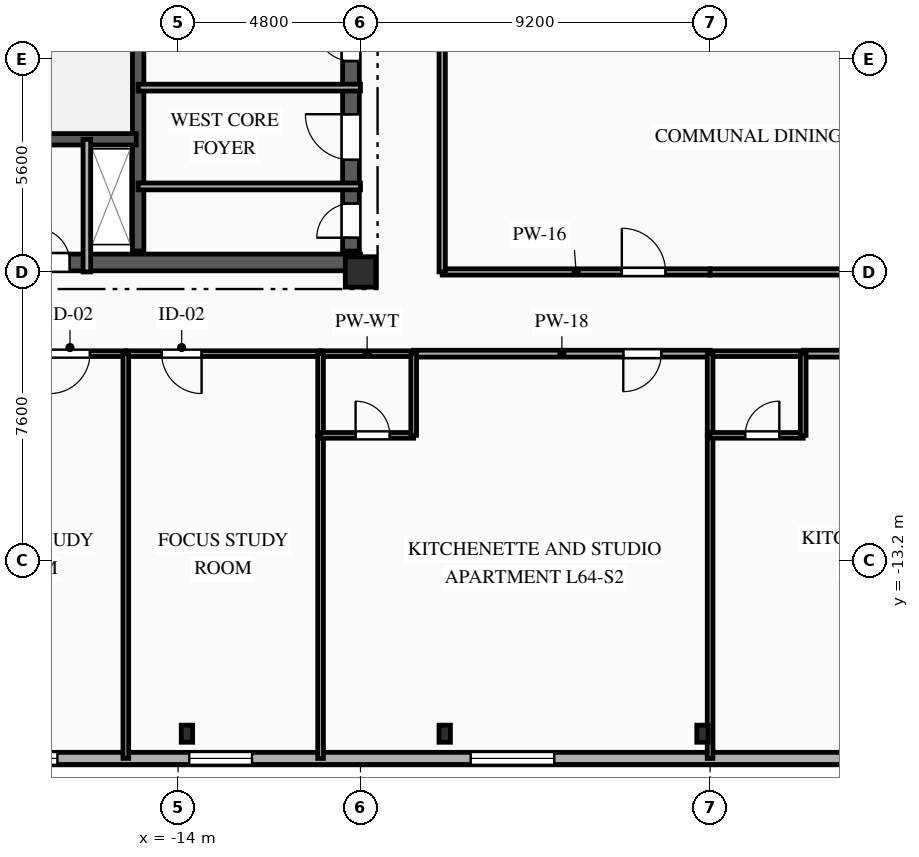
"""IFC4 building model, lengths in metres.
Left out: names, types, materials, properties, quantities, classifications, styles, units other than length and angle.
Written with IfcOpenShell. Run it as: python <this file> out.ifc"""

import sys

from ifc_helpers import new_model, si_unit, direction, frame, frame_2d, origin, origin_2d, place, context, subcontext, project, spatial, rectangle, i_section, extrude, element, fill, save


model = new_model("IFC4")
c1 = context("Model", 3, precision=1e-05, world=origin(), true_north=direction((0.0, 1.0)))
c2 = subcontext(c1, "Body", "Model", "MODEL_VIEW")
j1 = project(units=[si_unit("LENGTHUNIT", "METRE"), si_unit("PLANEANGLEUNIT", "RADIAN")], contexts=[c1])
p1 = place(None, origin())
s1 = spatial("IfcSite", under=j1, at=p1, CompositionType="ELEMENT")
p2 = place(p1, origin())
s2 = spatial("IfcBuilding", under=s1, at=p2, CompositionType="ELEMENT")
p3 = place(p2, frame((0.0, 0.0, 228.3)))
s3 = spatial("IfcBuildingStorey", under=s2, at=p3, CompositionType="ELEMENT", Elevation=228.3)
p4 = place(p3, frame((-9.2, -5.6, 0.0), z_axis=(0.0, 0.0, 1.0), x_axis=(1.0, 0.0, 0.0)))
e1 = element("IfcColumn", 1, at=p4, inside=s3, PredefinedType="COLUMN", context=c2, shape_type="SweptSolid", body=[
    extrude(rectangle(XDim=0.8, YDim=0.8, at=origin_2d()), origin(), (0.0, 0.0, 1.0), 3.35),
])
for number, where, z_axis, x_axis in (
    (2, (-13.767, -17.75, 0.0), (0.0, 0.0, 1.0), (1.0, 0.0, 0.0)),
    (3, (-6.983, -17.75, 0.0), (0.0, 0.0, 1.0), (1.0, 0.0, 0.0)),
    (4, (-0.2, -17.75, 0.0), (0.0, 0.0, 1.0), (1.0, 0.0, 0.0)),
):
    element("IfcColumn", number, at=place(p3, frame(where, z_axis=z_axis, x_axis=x_axis)), inside=s3, PredefinedType="COLUMN", context=c2, shape_type="SweptSolid", body=[
        extrude(i_section(OverallWidth=0.3, OverallDepth=0.45, WebThickness=0.014, FlangeThickness=0.026, FilletRadius=0.027, at=origin_2d()), origin(), (0.0, 0.0, 1.0), 3.35),
    ])
p5 = place(p3, frame((20.8, -18.4, 0.0), z_axis=(0.0, 0.0, 1.0), x_axis=(-1.0, 0.0, 0.0)))
e5 = element("IfcWall", 5, at=p5, inside=s3, PredefinedType="SOLIDWALL", context=c2, shape_type="SweptSolid", body=[
    extrude(rectangle(XDim=42.0, YDim=0.32, at=frame_2d((21.0, 0.0))), origin(), (0.0, 0.0, 1.0), 3.04),
])
p6 = place(p5, frame((2.135, 0.0, 0.85)))
e6 = element("IfcOpeningElement", 6, at=p6, cuts=e5, PredefinedType="OPENING", context=c2, shape_type="SweptSolid", body=[
    extrude(rectangle(XDim=1.65, YDim=1.85, at=frame_2d((0.825, 0.925))), frame((0.0, 0.17, 0.0), z_axis=(0.0, -1.0, 0.0), x_axis=(1.0, 0.0, 0.0)), (0.0, 0.0, 1.0), 0.34),
])
p7 = place(p5, frame((7.175, 0.0, 0.85)))
e7 = element("IfcOpeningElement", 7, at=p7, cuts=e5, PredefinedType="OPENING", context=c2, shape_type="SweptSolid", body=[
    extrude(rectangle(XDim=1.65, YDim=1.85, at=frame_2d((0.825, 0.925))), frame((0.0, 0.17, 0.0), z_axis=(0.0, -1.0, 0.0), x_axis=(1.0, 0.0, 0.0)), (0.0, 0.0, 1.0), 0.34),
])
p8 = place(p5, frame((14.58, 0.0, 0.85)))
e8 = element("IfcOpeningElement", 8, at=p8, cuts=e5, PredefinedType="OPENING", context=c2, shape_type="SweptSolid", body=[
    extrude(rectangle(XDim=2.2, YDim=1.85, at=frame_2d((1.1, 0.925))), frame((0.0, 0.17, 0.0), z_axis=(0.0, -1.0, 0.0), x_axis=(1.0, 0.0, 0.0)), (0.0, 0.0, 1.0), 0.34),
])
p9 = place(p5, frame((24.9, 0.0, 0.85)))
e9 = element("IfcOpeningElement", 9, at=p9, cuts=e5, PredefinedType="OPENING", context=c2, shape_type="SweptSolid", body=[
    extrude(rectangle(XDim=2.2, YDim=1.85, at=frame_2d((1.1, 0.925))), frame((0.0, 0.17, 0.0), z_axis=(0.0, -1.0, 0.0), x_axis=(1.0, 0.0, 0.0)), (0.0, 0.0, 1.0), 0.34),
])
p10 = place(p5, frame((32.855, 0.0, 0.85)))
e10 = element("IfcOpeningElement", 10, at=p10, cuts=e5, PredefinedType="OPENING", context=c2, shape_type="SweptSolid", body=[
    extrude(rectangle(XDim=1.65, YDim=1.85, at=frame_2d((0.825, 0.925))), frame((0.0, 0.17, 0.0), z_axis=(0.0, -1.0, 0.0), x_axis=(1.0, 0.0, 0.0)), (0.0, 0.0, 1.0), 0.34),
])
p11 = place(p5, frame((37.975, 0.0, 0.85)))
e11 = element("IfcOpeningElement", 11, at=p11, cuts=e5, PredefinedType="OPENING", context=c2, shape_type="SweptSolid", body=[
    extrude(rectangle(XDim=1.65, YDim=1.85, at=frame_2d((0.825, 0.925))), frame((0.0, 0.17, 0.0), z_axis=(0.0, -1.0, 0.0), x_axis=(1.0, 0.0, 0.0)), (0.0, 0.0, 1.0), 0.34),
])
p12 = place(p3, frame((-18.8, -5.35, 0.0), z_axis=(0.0, 0.0, 1.0), x_axis=(1.0, 0.0, 0.0)))
e12 = element("IfcWall", 12, at=p12, inside=s3, PredefinedType="SHEAR", context=c2, shape_type="SweptSolid", body=[
    extrude(rectangle(XDim=9.6, YDim=0.44, at=frame_2d((4.8, 0.0))), origin(), (0.0, 0.0, 1.0), 3.04),
])
p13 = place(p12, frame((1.05, 0.0, 0.0)))
e13 = element("IfcOpeningElement", 13, at=p13, cuts=e12, PredefinedType="OPENING", context=c2, shape_type="SweptSolid", body=[
    extrude(rectangle(XDim=0.9, YDim=2.1, at=frame_2d((0.45, 1.05))), frame((0.0, 0.23, 0.0), z_axis=(0.0, -1.0, 0.0), x_axis=(1.0, 0.0, 0.0)), (0.0, 0.0, 1.0), 0.46),
])
p14 = place(p3, frame((-9.45, -5.05, 0.0), z_axis=(0.0, 0.0, 1.0), x_axis=(0.0, 1.0, 0.0)))
e14 = element("IfcWall", 14, at=p14, inside=s3, PredefinedType="SHEAR", context=c2, shape_type="SweptSolid", body=[
    extrude(rectangle(XDim=10.1, YDim=0.44, at=frame_2d((5.05, 0.0))), origin(), (0.0, 0.0, 1.0), 3.04),
])
p15 = place(p14, frame((7.175, 0.0, 0.0)))
e15 = element("IfcOpeningElement", 15, at=p15, cuts=e14, PredefinedType="OPENING", context=c2, shape_type="SweptSolid", body=[
    extrude(rectangle(XDim=0.9, YDim=2.1, at=frame_2d((0.45, 1.05))), frame((0.0, 0.23, 0.0), z_axis=(0.0, -1.0, 0.0), x_axis=(1.0, 0.0, 0.0)), (0.0, 0.0, 1.0), 0.46),
])
p16 = place(p14, frame((2.4, 0.0, 0.0)))
e16 = element("IfcOpeningElement", 16, at=p16, cuts=e14, PredefinedType="OPENING", context=c2, shape_type="SweptSolid", body=[
    extrude(rectangle(XDim=1.2, YDim=2.15, at=frame_2d((0.6, 1.075))), frame((0.0, 0.23, 0.0), z_axis=(0.0, -1.0, 0.0), x_axis=(1.0, 0.0, 0.0)), (0.0, 0.0, 1.0), 0.46),
])
p17 = place(p14, frame((0.35, 0.0, 0.0)))
e17 = element("IfcOpeningElement", 17, at=p17, cuts=e14, PredefinedType="OPENING", context=c2, shape_type="SweptSolid", body=[
    extrude(rectangle(XDim=0.9, YDim=2.1, at=frame_2d((0.45, 1.05))), frame((0.0, 0.23, 0.0), z_axis=(0.0, -1.0, 0.0), x_axis=(1.0, 0.0, 0.0)), (0.0, 0.0, 1.0), 0.46),
])
p18 = place(p14, frame((5.0, 0.0, 0.0)))
e18 = element("IfcOpeningElement", 18, at=p18, cuts=e14, PredefinedType="OPENING", context=c2, shape_type="SweptSolid", body=[
    extrude(rectangle(XDim=0.9, YDim=2.1, at=frame_2d((0.45, 1.05))), frame((0.0, 0.23, 0.0), z_axis=(0.0, -1.0, 0.0), x_axis=(1.0, 0.0, 0.0)), (0.0, 0.0, 1.0), 0.46),
])
p19 = place(p3, frame((-15.05, -5.05, 0.0), z_axis=(0.0, 0.0, 1.0), x_axis=(0.0, 1.0, 0.0)))
e19 = element("IfcWall", 19, at=p19, inside=s3, PredefinedType="SHEAR", context=c2, shape_type="SweptSolid", body=[
    extrude(rectangle(XDim=10.1, YDim=0.3, at=frame_2d((5.05, 0.0))), origin(), (0.0, 0.0, 1.0), 3.04),
])
p20 = place(p3, frame((-18.28, -2.11, 0.0), z_axis=(0.0, 0.0, 1.0), x_axis=(1.0, 0.0, 0.0)))
e20 = element("IfcWall", 20, at=p20, inside=s3, PredefinedType="SHEAR", context=c2, shape_type="SweptSolid", body=[
    extrude(rectangle(XDim=3.18, YDim=0.3, at=frame_2d((1.59, 0.0))), origin(), (0.0, 0.0, 1.0), 3.04),
])
p21 = place(p3, frame((-16.4, -5.6, 0.0), z_axis=(0.0, 0.0, 1.0), x_axis=(0.0, 1.0, 0.0)))
e21 = element("IfcWall", 21, at=p21, inside=s3, PredefinedType="PARTITIONING", context=c2, shape_type="SweptSolid", body=[
    extrude(rectangle(XDim=3.49, YDim=0.2, at=frame_2d((1.745, 0.0))), origin(), (0.0, 0.0, 1.0), 3.04),
])
p22 = place(p3, frame((-15.05, -3.35, 0.0), z_axis=(0.0, 0.0, 1.0), x_axis=(1.0, 0.0, 0.0)))
e22 = element("IfcWall", 22, at=p22, inside=s3, PredefinedType="PARTITIONING", context=c2, shape_type="SweptSolid", body=[
    extrude(rectangle(XDim=5.85, YDim=0.18, at=frame_2d((2.925, 0.0))), origin(), (0.0, 0.0, 1.0), 2.755),
])
p23 = place(p3, frame((-9.2, -0.75, 0.0), z_axis=(0.0, 0.0, 1.0), x_axis=(-1.0, 0.0, 0.0)))
e23 = element("IfcWall", 23, at=p23, inside=s3, PredefinedType="PARTITIONING", context=c2, shape_type="SweptSolid", body=[
    extrude(rectangle(XDim=5.85, YDim=0.18, at=frame_2d((2.925, 0.0))), origin(), (0.0, 0.0, 1.0), 3.04),
])
p24 = place(p3, frame((-15.375, -7.75, 0.0), z_axis=(0.0, 0.0, 1.0), x_axis=(-1.0, 0.0, 0.0)))
e24 = element("IfcWall", 24, at=p24, inside=s3, PredefinedType="PARTITIONING", context=c2, shape_type="SweptSolid", body=[
    extrude(rectangle(XDim=5.125, YDim=0.15, at=frame_2d((2.562, 0.0))), origin(), (0.0, 0.0, 1.0), 3.04),
])
p25 = place(p24, frame((0.944, 0.0, 0.0)))
e25 = element("IfcOpeningElement", 25, at=p25, cuts=e24, PredefinedType="OPENING", context=c2, shape_type="SweptSolid", body=[
    extrude(rectangle(XDim=1.05, YDim=2.15, at=frame_2d((0.525, 1.075))), frame((0.0, 0.085, 0.0), z_axis=(0.0, -1.0, 0.0), x_axis=(1.0, 0.0, 0.0)), (0.0, 0.0, 1.0), 0.17),
])
p26 = place(p3, frame((-10.25, -7.75, 0.0), z_axis=(0.0, 0.0, 1.0), x_axis=(-1.0, 0.0, 0.0)))
e26 = element("IfcWall", 26, at=p26, inside=s3, PredefinedType="PARTITIONING", context=c2, shape_type="SweptSolid", body=[
    extrude(rectangle(XDim=5.125, YDim=0.15, at=frame_2d((2.562, 0.0))), origin(), (0.0, 0.0, 1.0), 3.04),
])
p27 = place(p26, frame((3.131, 0.0, 0.0)))
e27 = element("IfcOpeningElement", 27, at=p27, cuts=e26, PredefinedType="OPENING", context=c2, shape_type="SweptSolid", body=[
    extrude(rectangle(XDim=1.05, YDim=2.15, at=frame_2d((0.525, 1.075))), frame((0.0, 0.085, 0.0), z_axis=(0.0, -1.0, 0.0), x_axis=(1.0, 0.0, 0.0)), (0.0, 0.0, 1.0), 0.17),
])
p28 = place(p3, frame((0.0, -7.75, 0.0), z_axis=(0.0, 0.0, 1.0), x_axis=(-1.0, 0.0, 0.0)))
e28 = element("IfcWall", 28, at=p28, inside=s3, PredefinedType="PARTITIONING", context=c2, shape_type="SweptSolid", body=[
    extrude(rectangle(XDim=7.8, YDim=0.18, at=frame_2d((3.9, 0.0))), origin(), (0.0, 0.0, 1.0), 3.04),
])
p29 = place(p28, frame((1.285, 0.0, 0.0)))
e29 = element("IfcOpeningElement", 29, at=p29, cuts=e28, PredefinedType="OPENING", context=c2, shape_type="SweptSolid", body=[
    extrude(rectangle(XDim=1.0, YDim=2.15, at=frame_2d((0.5, 1.075))), frame((0.0, 0.1, 0.0), z_axis=(0.0, -1.0, 0.0), x_axis=(1.0, 0.0, 0.0)), (0.0, 0.0, 1.0), 0.2),
])
p30 = place(p3, frame((-7.8, -7.75, 0.0), z_axis=(0.0, 0.0, 1.0), x_axis=(-1.0, 0.0, 0.0)))
e30 = element("IfcWall", 30, at=p30, inside=s3, PredefinedType="PLUMBINGWALL", context=c2, shape_type="SweptSolid", body=[
    extrude(rectangle(XDim=2.45, YDim=0.15, at=frame_2d((1.225, 0.0))), origin(), (0.0, 0.0, 1.0), 3.04),
])
p31 = place(p3, frame((-7.05, -5.6, 0.0), z_axis=(0.0, 0.0, 1.0), x_axis=(1.0, 0.0, 0.0)))
e31 = element("IfcWall", 31, at=p31, inside=s3, PredefinedType="PARTITIONING", context=c2, shape_type="SweptSolid", body=[
    extrude(rectangle(XDim=7.05, YDim=0.165, at=frame_2d((3.525, 0.0))), origin(), (0.0, 0.0, 1.0), 2.525),
])
p32 = place(p31, frame((4.728, 0.0, 0.0)))
e32 = element("IfcOpeningElement", 32, at=p32, cuts=e31, PredefinedType="OPENING", context=c2, shape_type="SweptSolid", body=[
    extrude(rectangle(XDim=1.15, YDim=2.15, at=frame_2d((0.575, 1.075))), frame((0.0, 0.093, 0.0), z_axis=(0.0, -1.0, 0.0), x_axis=(1.0, 0.0, 0.0)), (0.0, 0.0, 1.0), 0.185),
])
p33 = place(p3, frame((10.25, -7.75, 0.0), z_axis=(0.0, 0.0, 1.0), x_axis=(-1.0, 0.0, 0.0)))
e33 = element("IfcWall", 33, at=p33, inside=s3, PredefinedType="PARTITIONING", context=c2, shape_type="SweptSolid", body=[
    extrude(rectangle(XDim=7.8, YDim=0.18, at=frame_2d((3.9, 0.0))), origin(), (0.0, 0.0, 1.0), 3.04),
])
p34 = place(p33, frame((5.515, 0.0, 0.0)))
e34 = element("IfcOpeningElement", 34, at=p34, cuts=e33, PredefinedType="OPENING", context=c2, shape_type="SweptSolid", body=[
    extrude(rectangle(XDim=1.0, YDim=2.15, at=frame_2d((0.5, 1.075))), frame((0.0, 0.1, 0.0), z_axis=(0.0, -1.0, 0.0), x_axis=(1.0, 0.0, 0.0)), (0.0, 0.0, 1.0), 0.2),
])
p35 = place(p3, frame((2.45, -7.75, 0.0), z_axis=(0.0, 0.0, 1.0), x_axis=(-1.0, 0.0, 0.0)))
e35 = element("IfcWall", 35, at=p35, inside=s3, PredefinedType="PLUMBINGWALL", context=c2, shape_type="SweptSolid", body=[
    extrude(rectangle(XDim=2.45, YDim=0.15, at=frame_2d((1.225, 0.0))), origin(), (0.0, 0.0, 1.0), 3.04),
])
p36 = place(p3, frame((0.0, -5.6, 0.0), z_axis=(0.0, 0.0, 1.0), x_axis=(1.0, 0.0, 0.0)))
e36 = element("IfcWall", 36, at=p36, inside=s3, PredefinedType="PARTITIONING", context=c2, shape_type="SweptSolid", body=[
    extrude(rectangle(XDim=7.05, YDim=0.165, at=frame_2d((3.525, 0.0))), origin(), (0.0, 0.0, 1.0), 2.525),
])
p37 = place(p3, frame((-7.05, 1.45, 0.0), z_axis=(0.0, 0.0, 1.0), x_axis=(0.0, -1.0, 0.0)))
e37 = element("IfcWall", 37, at=p37, inside=s3, PredefinedType="PARTITIONING", context=c2, shape_type="SweptSolid", body=[
    extrude(rectangle(XDim=7.05, YDim=0.165, at=frame_2d((3.525, 0.0))), origin(), (0.0, 0.0, 1.0), 3.04),
])
p38 = place(p3, frame((-15.375, -7.75, 0.0), z_axis=(0.0, 0.0, 1.0), x_axis=(0.0, -1.0, 0.0)))
e38 = element("IfcWall", 38, at=p38, inside=s3, PredefinedType="PARTITIONING", context=c2, shape_type="SweptSolid", body=[
    extrude(rectangle(XDim=10.65, YDim=0.15, at=frame_2d((5.325, 0.0))), origin(), (0.0, 0.0, 1.0), 3.04),
])
p39 = place(p3, frame((-10.25, -9.9, 0.0), z_axis=(0.0, 0.0, 1.0), x_axis=(0.0, -1.0, 0.0)))
e39 = element("IfcWall", 39, at=p39, inside=s3, PredefinedType="PARTITIONING", context=c2, shape_type="SweptSolid", body=[
    extrude(rectangle(XDim=8.5, YDim=0.15, at=frame_2d((4.25, 0.0))), origin(), (0.0, 0.0, 1.0), 3.04),
])
p40 = place(p3, frame((-10.25, -7.75, 0.0), z_axis=(0.0, 0.0, 1.0), x_axis=(0.0, -1.0, 0.0)))
e40 = element("IfcWall", 40, at=p40, inside=s3, PredefinedType="PLUMBINGWALL", context=c2, shape_type="SweptSolid", body=[
    extrude(rectangle(XDim=2.15, YDim=0.15, at=frame_2d((1.075, 0.0))), origin(), (0.0, 0.0, 1.0), 3.04),
])
p41 = place(p3, frame((-10.25, -9.9, 0.0), z_axis=(0.0, 0.0, 1.0), x_axis=(1.0, 0.0, 0.0)))
e41 = element("IfcWall", 41, at=p41, inside=s3, PredefinedType="PLUMBINGWALL", context=c2, shape_type="SweptSolid", body=[
    extrude(rectangle(XDim=2.45, YDim=0.15, at=frame_2d((1.225, 0.0))), origin(), (0.0, 0.0, 1.0), 3.04),
])
p42 = place(p41, frame((0.921, 0.0, 0.0)))
e42 = element("IfcOpeningElement", 42, at=p42, cuts=e41, PredefinedType="OPENING", context=c2, shape_type="SweptSolid", body=[
    extrude(rectangle(XDim=0.9, YDim=2.1, at=frame_2d((0.45, 1.05))), frame((0.0, 0.085, 0.0), z_axis=(0.0, -1.0, 0.0), x_axis=(1.0, 0.0, 0.0)), (0.0, 0.0, 1.0), 0.17),
])
p43 = place(p3, frame((-7.8, -9.9, 0.0), z_axis=(0.0, 0.0, 1.0), x_axis=(0.0, 1.0, 0.0)))
e43 = element("IfcWall", 43, at=p43, inside=s3, PredefinedType="PLUMBINGWALL", context=c2, shape_type="SweptSolid", body=[
    extrude(rectangle(XDim=2.15, YDim=0.15, at=frame_2d((1.075, 0.0))), origin(), (0.0, 0.0, 1.0), 3.04),
])
p44 = place(p3, frame((0.0, -9.9, 0.0), z_axis=(0.0, 0.0, 1.0), x_axis=(0.0, -1.0, 0.0)))
e44 = element("IfcWall", 44, at=p44, inside=s3, PredefinedType="PARTITIONING", context=c2, shape_type="SweptSolid", body=[
    extrude(rectangle(XDim=8.5, YDim=0.15, at=frame_2d((4.25, 0.0))), origin(), (0.0, 0.0, 1.0), 3.04),
])
p45 = place(p3, frame((0.0, -7.75, 0.0), z_axis=(0.0, 0.0, 1.0), x_axis=(0.0, -1.0, 0.0)))
e45 = element("IfcWall", 45, at=p45, inside=s3, PredefinedType="PLUMBINGWALL", context=c2, shape_type="SweptSolid", body=[
    extrude(rectangle(XDim=2.15, YDim=0.15, at=frame_2d((1.075, 0.0))), origin(), (0.0, 0.0, 1.0), 3.04),
])
p46 = place(p3, frame((0.0, -9.9, 0.0), z_axis=(0.0, 0.0, 1.0), x_axis=(1.0, 0.0, 0.0)))
e46 = element("IfcWall", 46, at=p46, inside=s3, PredefinedType="PLUMBINGWALL", context=c2, shape_type="SweptSolid", body=[
    extrude(rectangle(XDim=2.45, YDim=0.15, at=frame_2d((1.225, 0.0))), origin(), (0.0, 0.0, 1.0), 3.04),
])
p47 = place(p46, frame((0.921, 0.0, 0.0)))
e47 = element("IfcOpeningElement", 47, at=p47, cuts=e46, PredefinedType="OPENING", context=c2, shape_type="SweptSolid", body=[
    extrude(rectangle(XDim=0.9, YDim=2.1, at=frame_2d((0.45, 1.05))), frame((0.0, 0.085, 0.0), z_axis=(0.0, -1.0, 0.0), x_axis=(1.0, 0.0, 0.0)), (0.0, 0.0, 1.0), 0.17),
])
p48 = place(p3, frame((2.45, -9.9, 0.0), z_axis=(0.0, 0.0, 1.0), x_axis=(0.0, 1.0, 0.0)))
e48 = element("IfcWall", 48, at=p48, inside=s3, PredefinedType="PLUMBINGWALL", context=c2, shape_type="SweptSolid", body=[
    extrude(rectangle(XDim=2.15, YDim=0.15, at=frame_2d((1.075, 0.0))), origin(), (0.0, 0.0, 1.0), 3.04),
])
p49 = place(p9, origin())
e49 = element("IfcWindow", 49, at=p49, inside=s3, PartitioningType="SINGLE_PANEL", PredefinedType="WINDOW", context=c2, shape_type="SweptSolid", body=[
    extrude(rectangle(XDim=2.2, YDim=1.85, at=frame_2d((1.1, 0.925))), frame((0.0, 0.03, 0.0), z_axis=(0.0, -1.0, 0.0), x_axis=(1.0, 0.0, 0.0)), (0.0, 0.0, 1.0), 0.06),
])
fill(e9, e49)
p50 = place(p10, origin())
e50 = element("IfcWindow", 50, at=p50, inside=s3, PartitioningType="SINGLE_PANEL", PredefinedType="WINDOW", context=c2, shape_type="SweptSolid", body=[
    extrude(rectangle(XDim=1.65, YDim=1.85, at=frame_2d((0.825, 0.925))), frame((0.0, 0.03, 0.0), z_axis=(0.0, -1.0, 0.0), x_axis=(1.0, 0.0, 0.0)), (0.0, 0.0, 1.0), 0.06),
])
fill(e10, e50)
p51 = place(p11, origin())
e51 = element("IfcWindow", 51, at=p51, inside=s3, PartitioningType="SINGLE_PANEL", PredefinedType="WINDOW", context=c2, shape_type="SweptSolid", body=[
    extrude(rectangle(XDim=1.65, YDim=1.85, at=frame_2d((0.825, 0.925))), frame((0.0, 0.03, 0.0), z_axis=(0.0, -1.0, 0.0), x_axis=(1.0, 0.0, 0.0)), (0.0, 0.0, 1.0), 0.06),
])
fill(e11, e51)
p52 = place(p13, origin())
e52 = element("IfcDoor", 52, at=p52, inside=s3, OperationType="SINGLE_SWING_LEFT", PredefinedType="DOOR", context=c2, shape_type="SweptSolid", body=[
    extrude(rectangle(XDim=0.9, YDim=2.1, at=frame_2d((0.45, 1.05))), frame((0.0, 0.025, 0.0), z_axis=(0.0, -1.0, 0.0), x_axis=(1.0, 0.0, 0.0)), (0.0, 0.0, 1.0), 0.05),
])
fill(e13, e52)
p53 = place(p16, origin())
e53 = element("IfcDoor", 53, at=p53, inside=s3, OperationType="SINGLE_SWING_RIGHT", PredefinedType="DOOR", context=c2, shape_type="SweptSolid", body=[
    extrude(rectangle(XDim=1.2, YDim=2.15, at=frame_2d((0.6, 1.075))), frame((0.0, 0.025, 0.0), z_axis=(0.0, -1.0, 0.0), x_axis=(1.0, 0.0, 0.0)), (0.0, 0.0, 1.0), 0.05),
])
fill(e16, e53)
p54 = place(p17, origin())
e54 = element("IfcDoor", 54, at=p54, inside=s3, OperationType="SINGLE_SWING_LEFT", PredefinedType="DOOR", context=c2, shape_type="SweptSolid", body=[
    extrude(rectangle(XDim=0.9, YDim=2.1, at=frame_2d((0.45, 1.05))), frame((0.0, 0.025, 0.0), z_axis=(0.0, -1.0, 0.0), x_axis=(1.0, 0.0, 0.0)), (0.0, 0.0, 1.0), 0.05),
])
fill(e17, e54)
p55 = place(p18, origin())
e55 = element("IfcDoor", 55, at=p55, inside=s3, OperationType="SINGLE_SWING_RIGHT", PredefinedType="DOOR", context=c2, shape_type="SweptSolid", body=[
    extrude(rectangle(XDim=0.9, YDim=2.1, at=frame_2d((0.45, 1.05))), frame((0.0, 0.025, 0.0), z_axis=(0.0, -1.0, 0.0), x_axis=(1.0, 0.0, 0.0)), (0.0, 0.0, 1.0), 0.05),
])
fill(e18, e55)
p56 = place(p25, origin())
e56 = element("IfcDoor", 56, at=p56, inside=s3, OperationType="SINGLE_SWING_RIGHT", PredefinedType="DOOR", context=c2, shape_type="SweptSolid", body=[
    extrude(rectangle(XDim=1.05, YDim=2.15, at=frame_2d((0.525, 1.075))), frame((0.0, 0.025, 0.0), z_axis=(0.0, -1.0, 0.0), x_axis=(1.0, 0.0, 0.0)), (0.0, 0.0, 1.0), 0.05),
])
fill(e25, e56)
p57 = place(p27, origin())
e57 = element("IfcDoor", 57, at=p57, inside=s3, OperationType="SINGLE_SWING_LEFT", PredefinedType="DOOR", context=c2, shape_type="SweptSolid", body=[
    extrude(rectangle(XDim=1.05, YDim=2.15, at=frame_2d((0.525, 1.075))), frame((0.0, 0.025, 0.0), z_axis=(0.0, -1.0, 0.0), x_axis=(1.0, 0.0, 0.0)), (0.0, 0.0, 1.0), 0.05),
])
fill(e27, e57)
p58 = place(p29, origin())
e58 = element("IfcDoor", 58, at=p58, inside=s3, OperationType="SINGLE_SWING_RIGHT", PredefinedType="DOOR", context=c2, shape_type="SweptSolid", body=[
    extrude(rectangle(XDim=1.0, YDim=2.15, at=frame_2d((0.5, 1.075))), frame((0.0, 0.025, 0.0), z_axis=(0.0, -1.0, 0.0), x_axis=(1.0, 0.0, 0.0)), (0.0, 0.0, 1.0), 0.05),
])
fill(e29, e58)
p59 = place(p32, origin())
e59 = element("IfcDoor", 59, at=p59, inside=s3, OperationType="SINGLE_SWING_LEFT", PredefinedType="DOOR", context=c2, shape_type="SweptSolid", body=[
    extrude(rectangle(XDim=1.15, YDim=2.15, at=frame_2d((0.575, 1.075))), frame((0.0, 0.025, 0.0), z_axis=(0.0, -1.0, 0.0), x_axis=(1.0, 0.0, 0.0)), (0.0, 0.0, 1.0), 0.05),
])
fill(e32, e59)
p60 = place(p42, origin())
e60 = element("IfcDoor", 60, at=p60, inside=s3, OperationType="SINGLE_SWING_LEFT", PredefinedType="DOOR", context=c2, shape_type="SweptSolid", body=[
    extrude(rectangle(XDim=0.9, YDim=2.1, at=frame_2d((0.45, 1.05))), frame((0.0, 0.025, 0.0), z_axis=(0.0, -1.0, 0.0), x_axis=(1.0, 0.0, 0.0)), (0.0, 0.0, 1.0), 0.05),
])
fill(e42, e60)
p61 = place(p47, origin())
e61 = element("IfcDoor", 61, at=p61, inside=s3, OperationType="SINGLE_SWING_RIGHT", PredefinedType="DOOR", context=c2, shape_type="SweptSolid", body=[
    extrude(rectangle(XDim=0.9, YDim=2.1, at=frame_2d((0.45, 1.05))), frame((0.0, 0.025, 0.0), z_axis=(0.0, -1.0, 0.0), x_axis=(1.0, 0.0, 0.0)), (0.0, 0.0, 1.0), 0.05),
])
fill(e47, e61)
save(model, sys.argv[1])
